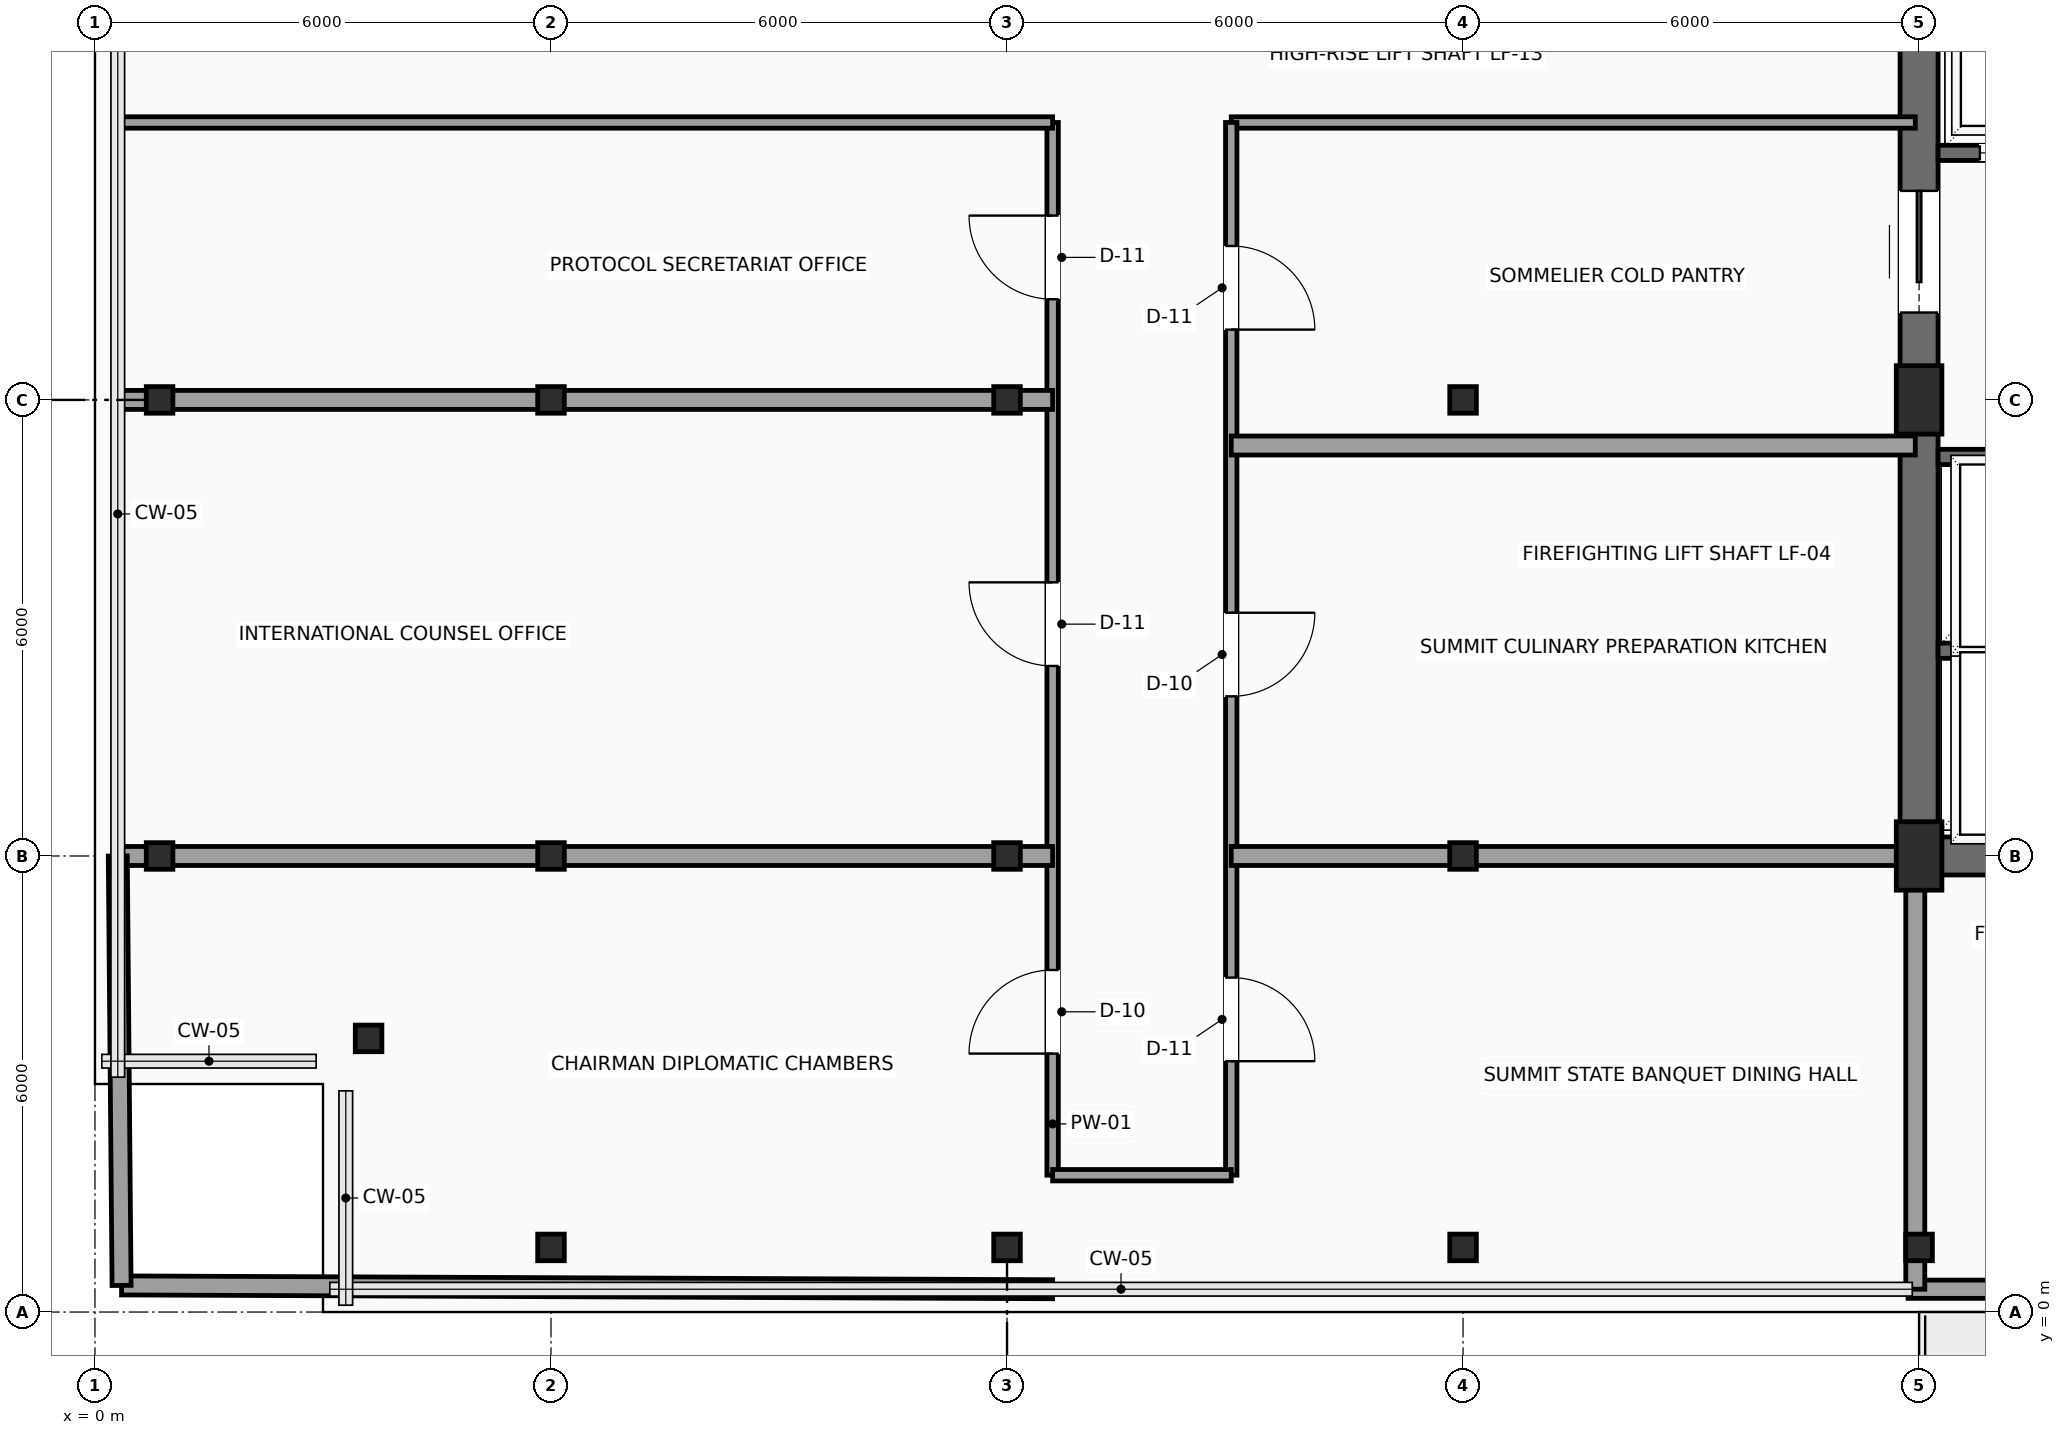
"""IFC4 building model, lengths in metres.
Left out: names, types, materials, properties, quantities, classifications, styles, units other than length and angle.
Written with IfcOpenShell. Run it as: python <this file> out.ifc"""

import sys

from ifc_helpers import new_model, si_unit, direction, frame, frame_2d, origin, origin_2d, place, context, subcontext, project, spatial, rectangle, hollow_rectangle, extrude, element, fill, save


model = new_model("IFC4")
c1 = context("Model", 3, precision=1e-05, world=origin(), true_north=direction((0.0, 1.0)))
c2 = subcontext(c1, "Body", "Model", "MODEL_VIEW")
j1 = project(units=[si_unit("LENGTHUNIT", "METRE"), si_unit("PLANEANGLEUNIT", "RADIAN")], contexts=[c1])
p1 = place(None, origin())
s1 = spatial("IfcSite", under=j1, at=p1, CompositionType="ELEMENT")
p2 = place(p1, origin())
s2 = spatial("IfcBuilding", under=s1, at=p2, CompositionType="ELEMENT")
p3 = place(p2, frame((0.0, 0.0, 288.7)))
s3 = spatial("IfcBuildingStorey", under=s2, at=p3, CompositionType="ELEMENT", Elevation=288.7)
for number, where, z_axis, x_axis in (
    (1, (24.0, 6.0, 0.0), (0.0, 0.0, 1.0), (1.0, 0.0, 0.0)),
    (2, (24.0, 12.0, 0.0), (0.0, 0.0, 1.0), (1.0, 0.0, 0.0)),
):
    element("IfcColumn", number, at=place(p3, frame(where, z_axis=z_axis, x_axis=x_axis)), inside=s3, PredefinedType="COLUMN", context=c2, shape_type="SweptSolid", body=[
        extrude(rectangle(XDim=0.6, YDim=0.9, at=origin_2d()), origin(), (0.0, 0.0, 1.0), 3.5),
    ])
for number, where, z_axis, x_axis in (
    (3, (3.6, 3.6, 0.0), (0.0, 0.0, 1.0), (1.0, 0.0, 0.0)),
    (4, (0.85, 6.0, 0.0), (0.0, 0.0, 1.0), (1.0, 0.0, 0.0)),
    (5, (0.85, 12.0, 0.0), (0.0, 0.0, 1.0), (1.0, 0.0, 0.0)),
    (6, (6.0, 0.85, 0.0), (0.0, 0.0, 1.0), (1.0, 0.0, 0.0)),
    (7, (6.0, 6.0, 0.0), (0.0, 0.0, 1.0), (1.0, 0.0, 0.0)),
    (8, (6.0, 12.0, 0.0), (0.0, 0.0, 1.0), (1.0, 0.0, 0.0)),
    (9, (12.0, 0.85, 0.0), (0.0, 0.0, 1.0), (1.0, 0.0, 0.0)),
    (10, (12.0, 6.0, 0.0), (0.0, 0.0, 1.0), (1.0, 0.0, 0.0)),
    (11, (12.0, 12.0, 0.0), (0.0, 0.0, 1.0), (1.0, 0.0, 0.0)),
    (12, (18.0, 0.85, 0.0), (0.0, 0.0, 1.0), (1.0, 0.0, 0.0)),
    (13, (18.0, 6.0, 0.0), (0.0, 0.0, 1.0), (1.0, 0.0, 0.0)),
    (14, (18.0, 12.0, 0.0), (0.0, 0.0, 1.0), (1.0, 0.0, 0.0)),
    (15, (24.0, 0.85, 0.0), (0.0, 0.0, 1.0), (1.0, 0.0, 0.0)),
):
    element("IfcColumn", number, at=place(p3, frame(where, z_axis=z_axis, x_axis=x_axis)), inside=s3, PredefinedType="COLUMN", context=c2, shape_type="SweptSolid", body=[
        extrude(hollow_rectangle(XDim=0.35, YDim=0.35, WallThickness=0.016, InnerFilletRadius=0.016, OuterFilletRadius=0.032, at=origin_2d()), origin(), (0.0, 0.0, 1.0), 3.5),
    ])
p4 = place(p3, frame((33.145, 0.3, 0.0), z_axis=(0.0, 0.0, 1.0), x_axis=(-1.0, 0.0, 0.0)))
e16 = element("IfcWall", 16, at=p4, inside=s3, PredefinedType="SOLIDWALL", context=c2, shape_type="SweptSolid", body=[
    extrude(rectangle(XDim=9.29, YDim=0.24, at=frame_2d((4.645, 0.0))), origin(), (0.0, 0.0, 1.0), 3.3),
])
p5 = place(p4, frame((3.945, 0.0, 0.0)))
e17 = element("IfcOpeningElement", 17, at=p5, cuts=e16, PredefinedType="OPENING", context=c2, shape_type="SweptSolid", body=[
    extrude(rectangle(XDim=1.05, YDim=2.2, at=frame_2d((0.525, 1.1))), frame((0.0, 0.13, 0.0), z_axis=(0.0, -1.0, 0.0), x_axis=(1.0, 0.0, 0.0)), (0.0, 0.0, 1.0), 0.26),
])
p6 = place(p4, frame((5.345, 0.0, 0.6)))
e18 = element("IfcOpeningElement", 18, at=p6, cuts=e16, PredefinedType="OPENING", context=c2, shape_type="SweptSolid", body=[
    extrude(rectangle(XDim=2.7, YDim=2.3, at=frame_2d((1.35, 1.15))), frame((0.0, 0.13, 0.0), z_axis=(0.0, -1.0, 0.0), x_axis=(1.0, 0.0, 0.0)), (0.0, 0.0, 1.0), 0.26),
])
p7 = place(p4, frame((1.4, 0.0, 0.6)))
e19 = element("IfcOpeningElement", 19, at=p7, cuts=e16, PredefinedType="OPENING", context=c2, shape_type="SweptSolid", body=[
    extrude(rectangle(XDim=0.9, YDim=2.2, at=frame_2d((0.45, 1.1))), frame((0.0, 0.13, 0.0), z_axis=(0.0, -1.0, 0.0), x_axis=(1.0, 0.0, 0.0)), (0.0, 0.0, 1.0), 0.26),
])
p8 = place(p3, frame((24.0, 6.0, 0.0), z_axis=(0.0, 0.0, 1.0), x_axis=(1.0, 0.0, 0.0)))
e20 = element("IfcWall", 20, at=p8, inside=s3, PredefinedType="SHEAR", context=c2, shape_type="SweptSolid", body=[
    extrude(rectangle(XDim=9.6, YDim=0.5, at=frame_2d((4.8, 0.0))), origin(), (0.0, 0.0, 1.0), 3.3),
])
p9 = place(p3, frame((24.0, 6.0, 0.0), z_axis=(0.0, 0.0, 1.0), x_axis=(0.0, 1.0, 0.0)))
e21 = element("IfcWall", 21, at=p9, inside=s3, PredefinedType="SHEAR", context=c2, shape_type="SweptSolid", body=[
    extrude(rectangle(XDim=12.0, YDim=0.5, at=frame_2d((6.0, 0.0))), origin(), (0.0, 0.0, 1.0), 3.3),
])
p10 = place(p9, frame((7.15, 0.0, 0.0)))
e22 = element("IfcOpeningElement", 22, at=p10, cuts=e21, PredefinedType="OPENING", context=c2, shape_type="SweptSolid", body=[
    extrude(rectangle(XDim=1.6, YDim=2.3, at=frame_2d((0.8, 1.15))), frame((0.0, 0.26, 0.0), z_axis=(0.0, -1.0, 0.0), x_axis=(1.0, 0.0, 0.0)), (0.0, 0.0, 1.0), 0.52),
])
for number, where, z_axis, x_axis in (
    (23, (24.25, 8.7, 0.0), (0.0, 0.0, 1.0), (1.0, 0.0, 0.0)),
    (24, (24.25, 11.25, 0.0), (0.0, 0.0, 1.0), (1.0, 0.0, 0.0)),
):
    element("IfcWall", number, at=place(p3, frame(where, z_axis=z_axis, x_axis=x_axis)), inside=s3, PredefinedType="SHEAR", context=c2, shape_type="SweptSolid", body=[
        extrude(rectangle(XDim=2.17, YDim=0.2, at=frame_2d((1.085, 0.0))), origin(), (0.0, 0.0, 1.0), 3.3),
    ])
p11 = place(p3, frame((24.25, 15.25, 0.0), z_axis=(0.0, 0.0, 1.0), x_axis=(1.0, 0.0, 0.0)))
e25 = element("IfcWall", 25, at=p11, inside=s3, PredefinedType="SHEAR", context=c2, shape_type="SweptSolid", body=[
    extrude(rectangle(XDim=5.2, YDim=0.2, at=frame_2d((2.6, 0.0))), origin(), (0.0, 0.0, 1.0), 3.3),
])
p12 = place(p11, frame((0.55, 0.0, 0.0)))
e26 = element("IfcOpeningElement", 26, at=p12, cuts=e25, PredefinedType="OPENING", context=c2, shape_type="SweptSolid", body=[
    extrude(rectangle(XDim=1.2, YDim=2.2, at=frame_2d((0.6, 1.1))), frame((0.0, 0.11, 0.0), z_axis=(0.0, -1.0, 0.0), x_axis=(1.0, 0.0, 0.0)), (0.0, 0.0, 1.0), 0.22),
])
p13 = place(p11, frame((3.15, 0.0, 0.0)))
e27 = element("IfcOpeningElement", 27, at=p13, cuts=e25, PredefinedType="OPENING", context=c2, shape_type="SweptSolid", body=[
    extrude(rectangle(XDim=1.2, YDim=2.2, at=frame_2d((0.6, 1.1))), frame((0.0, 0.11, 0.0), z_axis=(0.0, -1.0, 0.0), x_axis=(1.0, 0.0, 0.0)), (0.0, 0.0, 1.0), 0.22),
])
p14 = place(p3, frame((12.6, 1.8, 0.0), z_axis=(0.0, 0.0, 1.0), x_axis=(0.0, 1.0, 0.0)))
e28 = element("IfcWall", 28, at=p14, inside=s3, PredefinedType="PARTITIONING", context=c2, shape_type="SweptSolid", body=[
    extrude(rectangle(XDim=13.85, YDim=0.15, at=frame_2d((6.925, 0.0))), origin(), (0.0, 0.0, 1.0), 3.3),
])
p15 = place(p14, frame((1.6, 0.0, 0.0)))
e29 = element("IfcOpeningElement", 29, at=p15, cuts=e28, PredefinedType="OPENING", context=c2, shape_type="SweptSolid", body=[
    extrude(rectangle(XDim=1.1, YDim=2.25, at=frame_2d((0.55, 1.125))), frame((0.0, 0.085, 0.0), z_axis=(0.0, -1.0, 0.0), x_axis=(1.0, 0.0, 0.0)), (0.0, 0.0, 1.0), 0.17),
])
p16 = place(p14, frame((6.7, 0.0, 0.0)))
e30 = element("IfcOpeningElement", 30, at=p16, cuts=e28, PredefinedType="OPENING", context=c2, shape_type="SweptSolid", body=[
    extrude(rectangle(XDim=1.1, YDim=2.25, at=frame_2d((0.55, 1.125))), frame((0.0, 0.085, 0.0), z_axis=(0.0, -1.0, 0.0), x_axis=(1.0, 0.0, 0.0)), (0.0, 0.0, 1.0), 0.17),
])
p17 = place(p14, frame((11.525, 0.0, 0.0)))
e31 = element("IfcOpeningElement", 31, at=p17, cuts=e28, PredefinedType="OPENING", context=c2, shape_type="SweptSolid", body=[
    extrude(rectangle(XDim=1.1, YDim=2.25, at=frame_2d((0.55, 1.125))), frame((0.0, 0.085, 0.0), z_axis=(0.0, -1.0, 0.0), x_axis=(1.0, 0.0, 0.0)), (0.0, 0.0, 1.0), 0.17),
])
p18 = place(p3, frame((12.6, 15.65, 0.0), z_axis=(0.0, 0.0, 1.0), x_axis=(-1.0, 0.0, 0.0)))
e32 = element("IfcWall", 32, at=p18, inside=s3, PredefinedType="PARTITIONING", context=c2, shape_type="SweptSolid", body=[
    extrude(rectangle(XDim=12.3, YDim=0.15, at=frame_2d((6.15, 0.0))), origin(), (0.0, 0.0, 1.0), 3.3),
])
p19 = place(p3, frame((23.95, 15.65, 0.0), z_axis=(0.0, 0.0, 1.0), x_axis=(-1.0, 0.0, 0.0)))
e33 = element("IfcWall", 33, at=p19, inside=s3, PredefinedType="PARTITIONING", context=c2, shape_type="SweptSolid", body=[
    extrude(rectangle(XDim=9.0, YDim=0.15, at=frame_2d((4.5, 0.0))), origin(), (0.0, 0.0, 1.0), 3.3),
])
p20 = place(p3, frame((14.95, 15.65, 0.0), z_axis=(0.0, 0.0, 1.0), x_axis=(0.0, -1.0, 0.0)))
e34 = element("IfcWall", 34, at=p20, inside=s3, PredefinedType="PARTITIONING", context=c2, shape_type="SweptSolid", body=[
    extrude(rectangle(XDim=13.85, YDim=0.15, at=frame_2d((6.925, 0.0))), origin(), (0.0, 0.0, 1.0), 3.3),
])
p21 = place(p20, frame((11.25, 0.0, 0.0)))
e35 = element("IfcOpeningElement", 35, at=p21, cuts=e34, PredefinedType="OPENING", context=c2, shape_type="SweptSolid", body=[
    extrude(rectangle(XDim=1.1, YDim=2.25, at=frame_2d((0.55, 1.125))), frame((0.0, 0.085, 0.0), z_axis=(0.0, -1.0, 0.0), x_axis=(1.0, 0.0, 0.0)), (0.0, 0.0, 1.0), 0.17),
])
p22 = place(p20, frame((6.45, 0.0, 0.0)))
e36 = element("IfcOpeningElement", 36, at=p22, cuts=e34, PredefinedType="OPENING", context=c2, shape_type="SweptSolid", body=[
    extrude(rectangle(XDim=1.1, YDim=2.25, at=frame_2d((0.55, 1.125))), frame((0.0, 0.085, 0.0), z_axis=(0.0, -1.0, 0.0), x_axis=(1.0, 0.0, 0.0)), (0.0, 0.0, 1.0), 0.17),
])
p23 = place(p20, frame((1.625, 0.0, 0.0)))
e37 = element("IfcOpeningElement", 37, at=p23, cuts=e34, PredefinedType="OPENING", context=c2, shape_type="SweptSolid", body=[
    extrude(rectangle(XDim=1.1, YDim=2.25, at=frame_2d((0.55, 1.125))), frame((0.0, 0.085, 0.0), z_axis=(0.0, -1.0, 0.0), x_axis=(1.0, 0.0, 0.0)), (0.0, 0.0, 1.0), 0.17),
])
p24 = place(p3, frame((14.95, 1.8, 0.0), z_axis=(0.0, 0.0, 1.0), x_axis=(-1.0, 0.0, 0.0)))
e38 = element("IfcWall", 38, at=p24, inside=s3, PredefinedType="PARTITIONING", context=c2, shape_type="SweptSolid", body=[
    extrude(rectangle(XDim=2.35, YDim=0.15, at=frame_2d((1.175, 0.0))), origin(), (0.0, 0.0, 1.0), 3.3),
])
p25 = place(p3, frame((0.35, 0.35, 0.0), z_axis=(0.0, 0.0, 1.0), x_axis=(0.999991653965, -0.004085584524, 0.0)))
e39 = element("IfcWall", 39, at=p25, inside=s3, PredefinedType="PARTITIONING", context=c2, shape_type="SweptSolid", body=[
    extrude(rectangle(XDim=12.25, YDim=0.25, at=frame_2d((6.125, 0.0))), origin(), (0.0, 0.0, 1.0), 3.3),
])
p26 = place(p3, frame((0.3, 6.0, 0.0), z_axis=(0.0, 0.0, 1.0), x_axis=(1.0, 0.0, 0.0)))
e40 = element("IfcWall", 40, at=p26, inside=s3, PredefinedType="PARTITIONING", context=c2, shape_type="SweptSolid", body=[
    extrude(rectangle(XDim=12.3, YDim=0.25, at=frame_2d((6.15, 0.0))), origin(), (0.0, 0.0, 1.0), 2.992),
])
p27 = place(p3, frame((0.35, 0.35, 0.0), z_axis=(0.0, 0.0, 1.0), x_axis=(-0.00885800524, 0.999960767102, 0.0)))
e41 = element("IfcWall", 41, at=p27, inside=s3, PredefinedType="PARTITIONING", context=c2, shape_type="SweptSolid", body=[
    extrude(rectangle(XDim=5.65, YDim=0.25, at=frame_2d((2.825, 0.0))), origin(), (0.0, 0.0, 1.0), 3.3),
])
p28 = place(p3, frame((0.3, 12.0, 0.0), z_axis=(0.0, 0.0, 1.0), x_axis=(1.0, 0.0, 0.0)))
e42 = element("IfcWall", 42, at=p28, inside=s3, PredefinedType="PARTITIONING", context=c2, shape_type="SweptSolid", body=[
    extrude(rectangle(XDim=12.3, YDim=0.25, at=frame_2d((6.15, 0.0))), origin(), (0.0, 0.0, 1.0), 2.967),
])
p29 = place(p3, frame((14.95, 6.0, 0.0), z_axis=(0.0, 0.0, 1.0), x_axis=(1.0, 0.0, 0.0)))
e43 = element("IfcWall", 43, at=p29, inside=s3, PredefinedType="PARTITIONING", context=c2, shape_type="SweptSolid", body=[
    extrude(rectangle(XDim=9.0, YDim=0.25, at=frame_2d((4.5, 0.0))), origin(), (0.0, 0.0, 1.0), 2.992),
])
p30 = place(p3, frame((23.95, 0.3, 0.0), z_axis=(0.0, 0.0, 1.0), x_axis=(0.0, 1.0, 0.0)))
e44 = element("IfcWall", 44, at=p30, inside=s3, PredefinedType="PARTITIONING", context=c2, shape_type="SweptSolid", body=[
    extrude(rectangle(XDim=5.7, YDim=0.25, at=frame_2d((2.85, 0.0))), origin(), (0.0, 0.0, 1.0), 2.992),
])
p31 = place(p3, frame((14.95, 11.4, 0.0), z_axis=(0.0, 0.0, 1.0), x_axis=(1.0, 0.0, 0.0)))
e45 = element("IfcWall", 45, at=p31, inside=s3, PredefinedType="PARTITIONING", context=c2, shape_type="SweptSolid", body=[
    extrude(rectangle(XDim=9.0, YDim=0.25, at=frame_2d((4.5, 0.0))), origin(), (0.0, 0.0, 1.0), 3.3),
])
p32 = place(p10, origin())
e46 = element("IfcDoor", 46, at=p32, inside=s3, OperationType="DOUBLE_DOOR_SLIDING", PredefinedType="DOOR", context=c2, shape_type="SweptSolid", body=[
    extrude(rectangle(XDim=1.6, YDim=2.3, at=frame_2d((0.8, 1.15))), frame((0.0, 0.025, 0.0), z_axis=(0.0, -1.0, 0.0), x_axis=(1.0, 0.0, 0.0)), (0.0, 0.0, 1.0), 0.05),
])
fill(e22, e46)
p33 = place(p12, origin())
e47 = element("IfcDoor", 47, at=p33, inside=s3, OperationType="SLIDING_TO_RIGHT", PredefinedType="DOOR", context=c2, shape_type="SweptSolid", body=[
    extrude(rectangle(XDim=1.2, YDim=2.2, at=frame_2d((0.6, 1.1))), frame((0.0, 0.025, 0.0), z_axis=(0.0, -1.0, 0.0), x_axis=(1.0, 0.0, 0.0)), (0.0, 0.0, 1.0), 0.05),
])
fill(e26, e47)
p34 = place(p15, origin())
e48 = element("IfcDoor", 48, at=p34, inside=s3, OperationType="SINGLE_SWING_LEFT", PredefinedType="DOOR", context=c2, shape_type="SweptSolid", body=[
    extrude(rectangle(XDim=1.1, YDim=2.25, at=frame_2d((0.55, 1.125))), frame((0.0, 0.025, 0.0), z_axis=(0.0, -1.0, 0.0), x_axis=(1.0, 0.0, 0.0)), (0.0, 0.0, 1.0), 0.05),
])
fill(e29, e48)
p35 = place(p16, origin())
e49 = element("IfcDoor", 49, at=p35, inside=s3, OperationType="SINGLE_SWING_RIGHT", PredefinedType="DOOR", context=c2, shape_type="SweptSolid", body=[
    extrude(rectangle(XDim=1.1, YDim=2.25, at=frame_2d((0.55, 1.125))), frame((0.0, 0.025, 0.0), z_axis=(0.0, -1.0, 0.0), x_axis=(1.0, 0.0, 0.0)), (0.0, 0.0, 1.0), 0.05),
])
fill(e30, e49)
p36 = place(p17, origin())
e50 = element("IfcDoor", 50, at=p36, inside=s3, OperationType="SINGLE_SWING_RIGHT", PredefinedType="DOOR", context=c2, shape_type="SweptSolid", body=[
    extrude(rectangle(XDim=1.1, YDim=2.25, at=frame_2d((0.55, 1.125))), frame((0.0, 0.025, 0.0), z_axis=(0.0, -1.0, 0.0), x_axis=(1.0, 0.0, 0.0)), (0.0, 0.0, 1.0), 0.05),
])
fill(e31, e50)
p37 = place(p21, origin())
e51 = element("IfcDoor", 51, at=p37, inside=s3, OperationType="SINGLE_SWING_RIGHT", PredefinedType="DOOR", context=c2, shape_type="SweptSolid", body=[
    extrude(rectangle(XDim=1.1, YDim=2.25, at=frame_2d((0.55, 1.125))), frame((0.0, 0.025, 0.0), z_axis=(0.0, -1.0, 0.0), x_axis=(1.0, 0.0, 0.0)), (0.0, 0.0, 1.0), 0.05),
])
fill(e35, e51)
p38 = place(p22, origin())
e52 = element("IfcDoor", 52, at=p38, inside=s3, OperationType="SINGLE_SWING_LEFT", PredefinedType="DOOR", context=c2, shape_type="SweptSolid", body=[
    extrude(rectangle(XDim=1.1, YDim=2.25, at=frame_2d((0.55, 1.125))), frame((0.0, 0.025, 0.0), z_axis=(0.0, -1.0, 0.0), x_axis=(1.0, 0.0, 0.0)), (0.0, 0.0, 1.0), 0.05),
])
fill(e36, e52)
p39 = place(p23, origin())
e53 = element("IfcDoor", 53, at=p39, inside=s3, OperationType="SINGLE_SWING_RIGHT", PredefinedType="DOOR", context=c2, shape_type="SweptSolid", body=[
    extrude(rectangle(XDim=1.1, YDim=2.25, at=frame_2d((0.55, 1.125))), frame((0.0, 0.025, 0.0), z_axis=(0.0, -1.0, 0.0), x_axis=(1.0, 0.0, 0.0)), (0.0, 0.0, 1.0), 0.05),
])
fill(e37, e53)
save(model, sys.argv[1])
